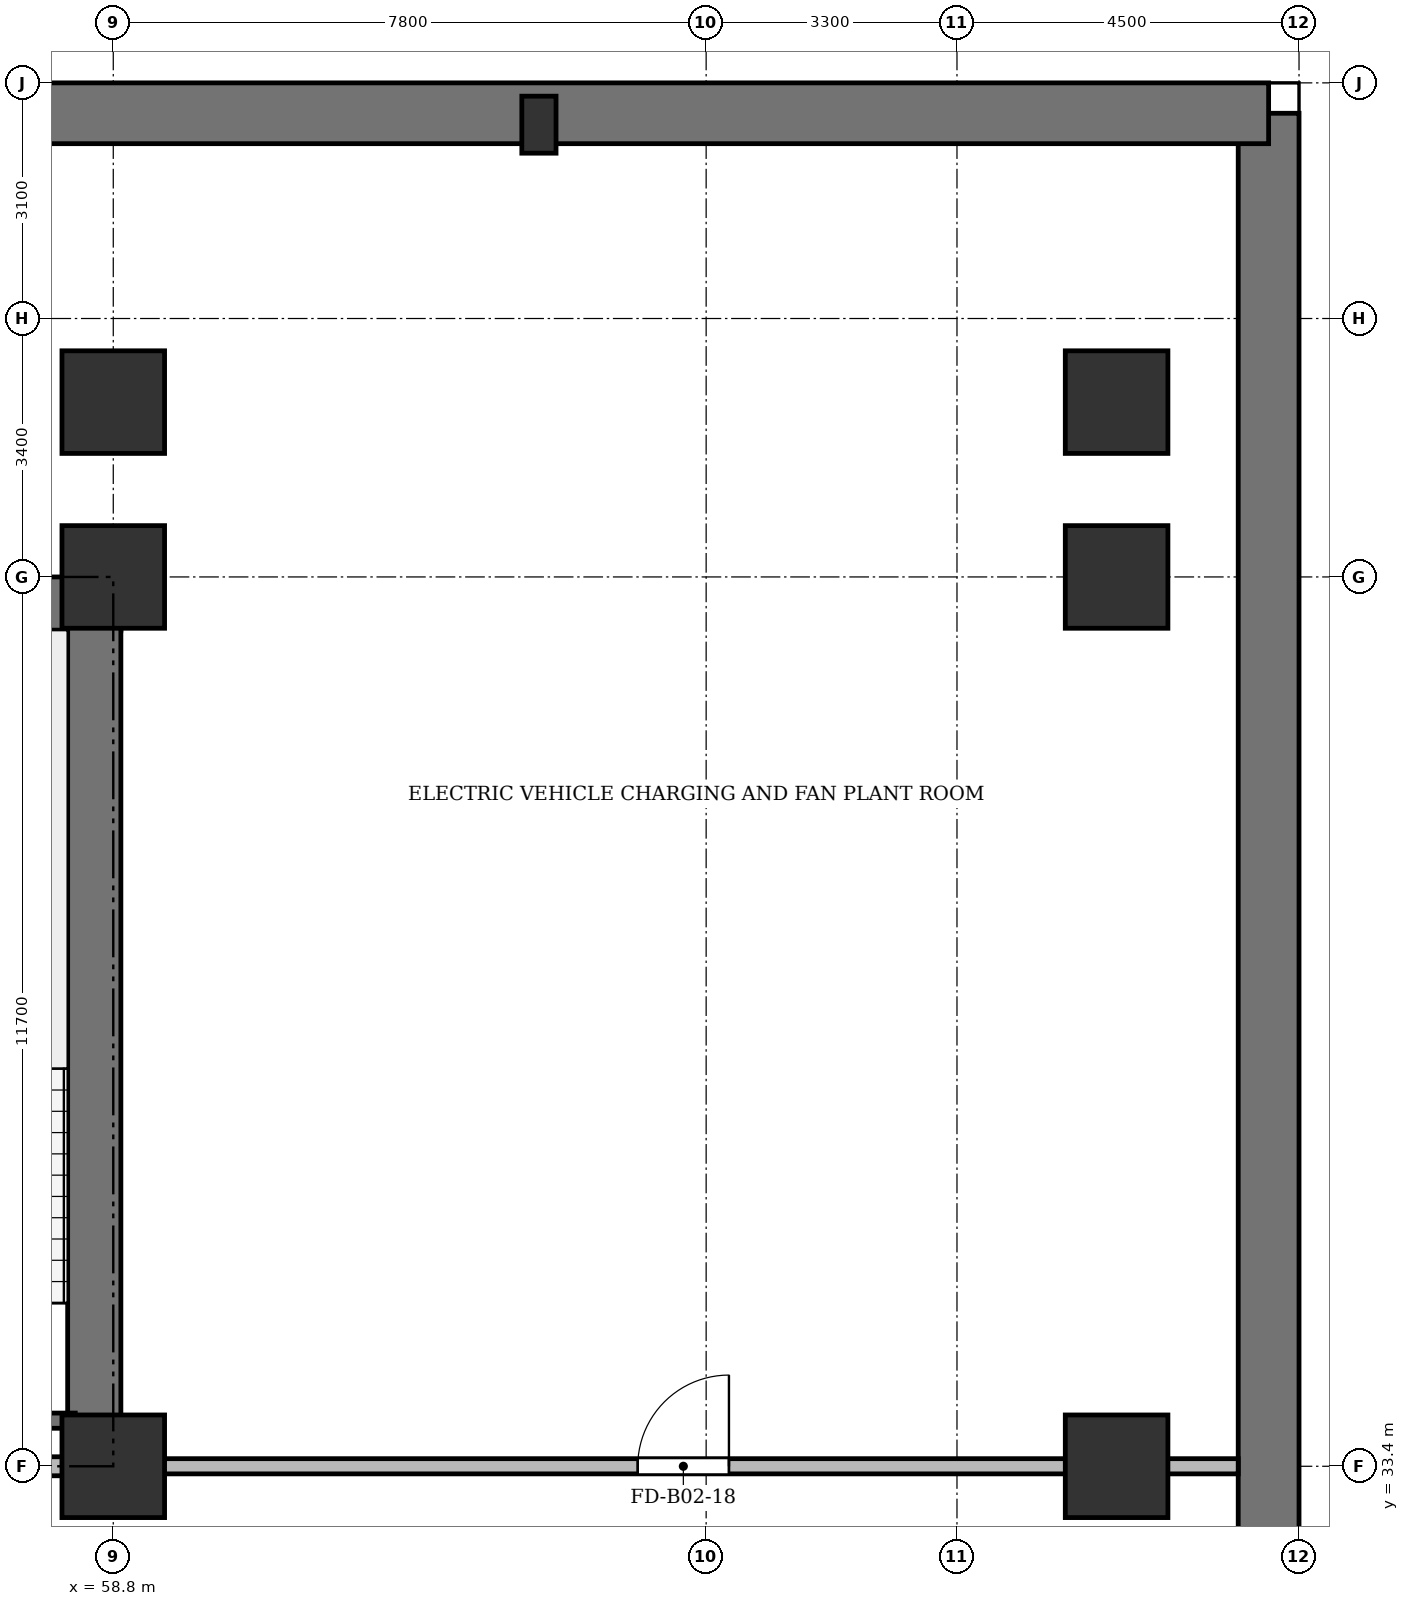
"""IFC4 building model, lengths in metres.
Left out: names, types, materials, properties, quantities, classifications, styles, units other than length and angle.
Written with IfcOpenShell. Run it as: python <this file> out.ifc"""

import sys

from ifc_helpers import new_model, si_unit, direction, frame, frame_2d, origin, origin_2d, place, context, subcontext, project, spatial, rectangle, extrude, source, transform, mapped, element, fill, save


model = new_model("IFC4")
c1 = context("Model", 3, precision=1e-05, world=origin(), true_north=direction((0.0, 1.0)))
c2 = subcontext(c1, "Body", "Model", "MODEL_VIEW")
j1 = project(units=[si_unit("LENGTHUNIT", "METRE"), si_unit("PLANEANGLEUNIT", "RADIAN")], contexts=[c1])
p1 = place(None, origin())
s1 = spatial("IfcSite", under=j1, at=p1, CompositionType="ELEMENT")
p2 = place(p1, origin())
s2 = spatial("IfcBuilding", under=s1, at=p2, CompositionType="ELEMENT")
p3 = place(p2, frame((0.0, 0.0, -8.6)))
s3 = spatial("IfcBuildingStorey", under=s2, at=p3, CompositionType="ELEMENT", Elevation=-8.6)
m1 = source(origin(), c2, "Body", "SweptSolid", [
    extrude(rectangle(XDim=1.35, YDim=1.35, at=origin_2d()), origin(), (0.0, 0.0, 1.0), 4.3),
])
for number, where, z_axis, x_axis in (
    (1, (58.8, 33.4, 0.0), (0.0, 0.0, 1.0), (1.0, 0.0, 0.0)),
    (2, (58.8, 45.1, 0.0), (0.0, 0.0, 1.0), (1.0, 0.0, 0.0)),
    (3, (58.8, 47.4, 0.0), (0.0, 0.0, 1.0), (1.0, 0.0, 0.0)),
    (4, (72.0, 33.4, 0.0), (0.0, 0.0, 1.0), (1.0, 0.0, 0.0)),
    (5, (72.0, 45.1, 0.0), (0.0, 0.0, 1.0), (1.0, 0.0, 0.0)),
    (6, (72.0, 47.4, 0.0), (0.0, 0.0, 1.0), (1.0, 0.0, 0.0)),
):
    element("IfcColumn", number, at=place(p3, frame(where, z_axis=z_axis, x_axis=x_axis)), inside=s3, PredefinedType="COLUMN", context=c2, shape_type="MappedRepresentation", body=[
        mapped(m1, transform((0.0, 0.0, 0.0), x_axis=(1.0, 0.0, 0.0), y_axis=(0.0, 1.0, 0.0), z_axis=(0.0, 0.0, 1.0), scale=1.0)),
    ])
m2 = source(origin(), c2, "Body", "SweptSolid", [
    extrude(rectangle(XDim=0.45, YDim=0.75, at=origin_2d()), origin(), (0.0, 0.0, 1.0), 4.3),
])
p4 = place(p3, frame((64.4, 51.05, 0.0), z_axis=(0.0, 0.0, 1.0), x_axis=(1.0, 0.0, 0.0)))
e7 = element("IfcColumn", 7, at=p4, inside=s3, PredefinedType="PILASTER", context=c2, shape_type="MappedRepresentation", body=[
    mapped(m2, transform((0.0, 0.0, 0.0), x_axis=(1.0, 0.0, 0.0), y_axis=(0.0, 1.0, 0.0), z_axis=(0.0, 0.0, 1.0), scale=1.0)),
])
p5 = place(p3, frame((74.0, 0.4, 0.0), z_axis=(0.0, 0.0, 1.0), x_axis=(0.0, 1.0, 0.0)))
e8 = element("IfcWall", 8, at=p5, inside=s3, PredefinedType="USERDEFINED", context=c2, shape_type="SweptSolid", body=[
    extrude(rectangle(XDim=50.8, YDim=0.8, at=frame_2d((25.4, 0.0))), origin(), (0.0, 0.0, 1.0), 3.98),
])
p6 = place(p3, frame((74.0, 51.2, 0.0), z_axis=(0.0, 0.0, 1.0), x_axis=(-1.0, 0.0, 0.0)))
e9 = element("IfcWall", 9, at=p6, inside=s3, PredefinedType="USERDEFINED", context=c2, shape_type="SweptSolid", body=[
    extrude(rectangle(XDim=73.6, YDim=0.8, at=frame_2d((36.8, 0.0))), origin(), (0.0, 0.0, 1.0), 3.98),
])
p7 = place(p3, frame((15.5, 44.75, 0.0), z_axis=(0.0, 0.0, 1.0), x_axis=(1.0, 0.0, 0.0)))
e10 = element("IfcWall", 10, at=p7, inside=s3, PredefinedType="SHEAR", context=c2, shape_type="SweptSolid", body=[
    extrude(rectangle(XDim=43.4, YDim=0.7, at=frame_2d((21.7, 0.0))), origin(), (0.0, 0.0, 1.0), 3.98),
])
p8 = place(p3, frame((58.55, 33.4, 0.0), z_axis=(0.0, 0.0, 1.0), x_axis=(0.0, 1.0, 0.0)))
e11 = element("IfcWall", 11, at=p8, inside=s3, PredefinedType="SHEAR", context=c2, shape_type="SweptSolid", body=[
    extrude(rectangle(XDim=11.7, YDim=0.7, at=frame_2d((5.85, 0.0))), origin(), (0.0, 0.0, 1.0), 3.98),
])
p9 = place(p3, frame((54.9, 34.0, 0.0), z_axis=(0.0, 0.0, 1.0), x_axis=(1.0, 0.0, 0.0)))
e12 = element("IfcWall", 12, at=p9, inside=s3, PredefinedType="SHEAR", context=c2, shape_type="SweptSolid", body=[
    extrude(rectangle(XDim=3.4, YDim=0.2, at=frame_2d((1.7, 0.0))), origin(), (0.0, 0.0, 1.0), 3.98),
])
p10 = place(p3, frame((47.15, 33.4, 0.0), z_axis=(0.0, 0.0, 1.0), x_axis=(1.0, 0.0, 0.0)))
e13 = element("IfcWall", 13, at=p10, inside=s3, PredefinedType="PARTITIONING", context=c2, shape_type="SweptSolid", body=[
    extrude(rectangle(XDim=11.15, YDim=0.25, at=frame_2d((5.575, 0.0))), origin(), (0.0, 0.0, 1.0), 3.28),
])
p11 = place(p10, frame((0.7, 0.0, 0.0)))
e14 = element("IfcOpeningElement", 14, at=p11, cuts=e13, PredefinedType="OPENING", context=c2, shape_type="SweptSolid", body=[
    extrude(rectangle(XDim=0.95, YDim=2.15, at=frame_2d((0.475, 1.075))), frame((0.0, 0.135, 0.0), z_axis=(0.0, -1.0, 0.0), x_axis=(1.0, 0.0, 0.0)), (0.0, 0.0, 1.0), 0.27),
])
p12 = place(p10, frame((6.0, 0.0, 0.0)))
e15 = element("IfcOpeningElement", 15, at=p12, cuts=e13, PredefinedType="OPENING", context=c2, shape_type="SweptSolid", body=[
    extrude(rectangle(XDim=1.2, YDim=2.15, at=frame_2d((0.6, 1.075))), frame((0.0, 0.135, 0.0), z_axis=(0.0, -1.0, 0.0), x_axis=(1.0, 0.0, 0.0)), (0.0, 0.0, 1.0), 0.27),
])
p13 = place(p3, frame((58.5, 33.4, 0.0), z_axis=(0.0, 0.0, 1.0), x_axis=(1.0, 0.0, 0.0)))
e16 = element("IfcWall", 16, at=p13, inside=s3, PredefinedType="PARTITIONING", context=c2, shape_type="SweptSolid", body=[
    extrude(rectangle(XDim=15.1, YDim=0.2, at=frame_2d((7.55, 0.0))), origin(), (0.0, 0.0, 1.0), 3.28),
])
p14 = place(p13, frame((7.2, 0.0, 0.0)))
e17 = element("IfcOpeningElement", 17, at=p14, cuts=e16, PredefinedType="OPENING", context=c2, shape_type="SweptSolid", body=[
    extrude(rectangle(XDim=1.2, YDim=2.15, at=frame_2d((0.6, 1.075))), frame((0.0, 0.11, 0.0), z_axis=(0.0, -1.0, 0.0), x_axis=(1.0, 0.0, 0.0)), (0.0, 0.0, 1.0), 0.22),
])
m3 = source(origin(), c2, "Body", "SweptSolid", [
    extrude(rectangle(XDim=1.2, YDim=2.15, at=frame_2d((0.6, 1.075))), frame((0.0, 0.025, 0.0), z_axis=(0.0, -1.0, 0.0), x_axis=(1.0, 0.0, 0.0)), (0.0, 0.0, 1.0), 0.05),
])
p15 = place(p14, origin())
e18 = element("IfcDoor", 18, at=p15, inside=s3, OperationType="SINGLE_SWING_RIGHT", PredefinedType="DOOR", context=c2, shape_type="MappedRepresentation", body=[
    mapped(m3, transform((0.0, 0.0, 0.0), x_axis=(1.0, 0.0, 0.0), y_axis=(0.0, 1.0, 0.0), z_axis=(0.0, 0.0, 1.0), scale=1.0)),
])
fill(e17, e18)
save(model, sys.argv[1])
